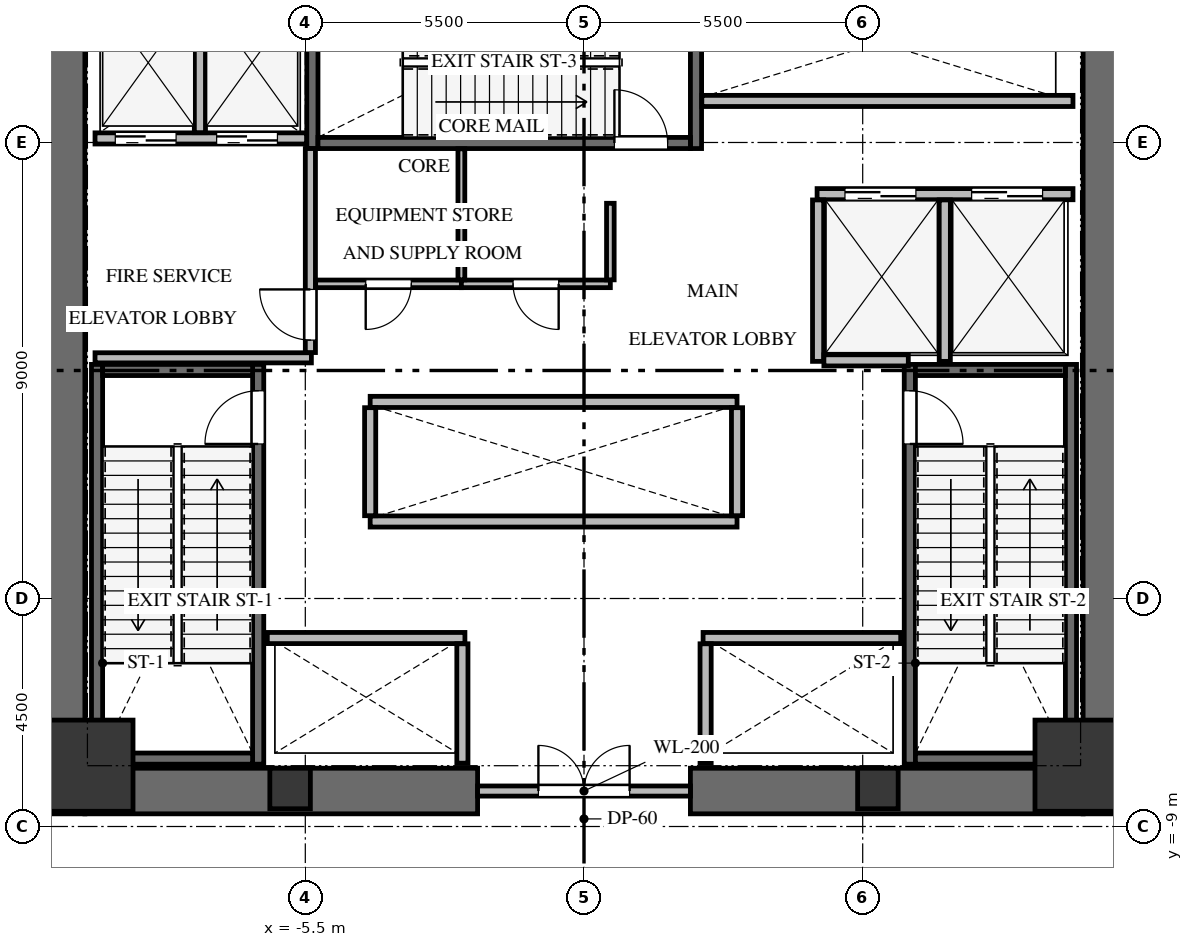
"""IFC4 building model, lengths in metres.
Left out: names, types, materials, properties, quantities, classifications, styles, units other than length and angle.
Written with IfcOpenShell. Run it as: python <this file> out.ifc"""

import sys

from ifc_helpers import new_model, si_unit, direction, frame, frame_2d, origin, origin_2d, place, context, subcontext, project, spatial, rectangle, extrude, source, transform, mapped, element, fill, save


model = new_model("IFC4")
c1 = context("Model", 3, precision=1e-05, world=origin(), true_north=direction((0.0, 1.0)))
c2 = subcontext(c1, "Body", "Model", "MODEL_VIEW")
j1 = project(units=[si_unit("LENGTHUNIT", "METRE"), si_unit("PLANEANGLEUNIT", "RADIAN")], contexts=[c1])
p1 = place(None, origin())
s1 = spatial("IfcSite", under=j1, at=p1, CompositionType="ELEMENT")
p2 = place(p1, origin())
s2 = spatial("IfcBuilding", under=s1, at=p2, CompositionType="ELEMENT")
p3 = place(p2, frame((0.0, 0.0, 15.6)))
s3 = spatial("IfcBuildingStorey", under=s2, at=p3, CompositionType="ELEMENT", Elevation=15.6)
for number, where, z_axis, x_axis in (
    (1, (-10.3, -8.75, 0.0), (0.0, 0.0, 1.0), (0.0, 1.0, 0.0)),
    (2, (10.3, -8.75, 0.0), (0.0, 0.0, 1.0), (0.0, 1.0, 0.0)),
):
    element("IfcWall", number, at=place(p3, frame(where, z_axis=z_axis, x_axis=x_axis)), inside=s3, PredefinedType="SHEAR", context=c2, shape_type="SweptSolid", body=[
        extrude(rectangle(XDim=17.5, YDim=0.9, at=frame_2d((8.75, 0.0))), origin(), (0.0, 0.0, 1.0), 5.6),
    ])
for number, where, z_axis, x_axis in (
    (3, (-9.85, -8.3, 0.0), (0.0, 0.0, 1.0), (1.0, 0.0, 0.0)),
    (4, (2.1, -8.3, 0.0), (0.0, 0.0, 1.0), (1.0, 0.0, 0.0)),
):
    element("IfcWall", number, at=place(p3, frame(where, z_axis=z_axis, x_axis=x_axis)), inside=s3, PredefinedType="SHEAR", context=c2, shape_type="SweptSolid", body=[
        extrude(rectangle(XDim=7.75, YDim=0.9, at=frame_2d((3.875, 0.0))), origin(), (0.0, 0.0, 1.0), 5.6),
    ])
p4 = place(p3, frame((-6.43, -7.77, -0.32), z_axis=(0.0, 0.0, 1.0), x_axis=(0.0, 1.0, 0.0)))
e5 = element("IfcWall", 5, at=p4, inside=s3, PredefinedType="SHEAR", context=c2, shape_type="SweptSolid", body=[
    extrude(rectangle(XDim=7.89, YDim=0.22, at=frame_2d((3.945, 0.0))), origin(), (0.0, 0.0, 1.0), 5.6),
])
p5 = place(p4, frame((6.32, 0.0, 0.0)))
e6 = element("IfcOpeningElement", 6, at=p5, cuts=e5, PredefinedType="OPENING", context=c2, shape_type="SweptSolid", body=[
    extrude(rectangle(XDim=1.05, YDim=2.15, at=frame_2d((0.525, 1.075))), frame((0.0, 0.12, 0.0), z_axis=(0.0, -1.0, 0.0), x_axis=(1.0, 0.0, 0.0)), (0.0, 0.0, 1.0), 0.24),
])
p6 = place(p3, frame((-9.61, 0.12, -0.32), z_axis=(0.0, 0.0, 1.0), x_axis=(0.0, -1.0, 0.0)))
e7 = element("IfcWall", 7, at=p6, inside=s3, PredefinedType="SHEAR", context=c2, shape_type="SweptSolid", body=[
    extrude(rectangle(XDim=7.89, YDim=0.22, at=frame_2d((3.945, 0.0))), origin(), (0.0, 0.0, 1.0), 5.6),
])
for number, where, z_axis, x_axis in (
    (8, (-9.5, -7.66, -0.32), (0.0, 0.0, 1.0), (1.0, 0.0, 0.0)),
    (9, (-6.54, 0.01, -0.32), (0.0, 0.0, 1.0), (-1.0, 0.0, 0.0)),
):
    element("IfcWall", number, at=place(p3, frame(where, z_axis=z_axis, x_axis=x_axis)), inside=s3, PredefinedType="SHEAR", context=c2, shape_type="SweptSolid", body=[
        extrude(rectangle(XDim=2.96, YDim=0.22, at=frame_2d((1.48, 0.0))), origin(), (0.0, 0.0, 1.0), 5.6),
    ])
p7 = place(p3, frame((9.61, -7.77, -0.32), z_axis=(0.0, 0.0, 1.0), x_axis=(0.0, 1.0, 0.0)))
e10 = element("IfcWall", 10, at=p7, inside=s3, PredefinedType="SHEAR", context=c2, shape_type="SweptSolid", body=[
    extrude(rectangle(XDim=7.89, YDim=0.22, at=frame_2d((3.945, 0.0))), origin(), (0.0, 0.0, 1.0), 5.6),
])
p8 = place(p3, frame((6.43, 0.12, -0.32), z_axis=(0.0, 0.0, 1.0), x_axis=(0.0, -1.0, 0.0)))
e11 = element("IfcWall", 11, at=p8, inside=s3, PredefinedType="SHEAR", context=c2, shape_type="SweptSolid", body=[
    extrude(rectangle(XDim=7.89, YDim=0.22, at=frame_2d((3.945, 0.0))), origin(), (0.0, 0.0, 1.0), 5.6),
])
p9 = place(p8, frame((0.52, 0.0, 0.0)))
e12 = element("IfcOpeningElement", 12, at=p9, cuts=e11, PredefinedType="OPENING", context=c2, shape_type="SweptSolid", body=[
    extrude(rectangle(XDim=1.05, YDim=2.15, at=frame_2d((0.525, 1.075))), frame((0.0, 0.12, 0.0), z_axis=(0.0, -1.0, 0.0), x_axis=(1.0, 0.0, 0.0)), (0.0, 0.0, 1.0), 0.24),
])
for number, where, z_axis, x_axis in (
    (13, (6.54, -7.66, -0.32), (0.0, 0.0, 1.0), (1.0, 0.0, 0.0)),
    (14, (9.5, 0.01, -0.32), (0.0, 0.0, 1.0), (-1.0, 0.0, 0.0)),
):
    element("IfcWall", number, at=place(p3, frame(where, z_axis=z_axis, x_axis=x_axis)), inside=s3, PredefinedType="SHEAR", context=c2, shape_type="SweptSolid", body=[
        extrude(rectangle(XDim=2.96, YDim=0.22, at=frame_2d((1.48, 0.0))), origin(), (0.0, 0.0, 1.0), 5.6),
    ])
for number, where, z_axis, x_axis in (
    (15, (2.21, 4.38, -0.32), (0.0, 0.0, 1.0), (0.0, 1.0, 0.0)),
    (16, (-5.36, 7.78, -0.32), (0.0, 0.0, 1.0), (0.0, -1.0, 0.0)),
):
    element("IfcWall", number, at=place(p3, frame(where, z_axis=z_axis, x_axis=x_axis)), inside=s3, PredefinedType="SHEAR", context=c2, shape_type="SweptSolid", body=[
        extrude(rectangle(XDim=3.4, YDim=0.22, at=frame_2d((1.7, 0.0))), origin(), (0.0, 0.0, 1.0), 5.6),
    ])
p10 = place(p3, frame((-5.25, 4.49, -0.32), z_axis=(0.0, 0.0, 1.0), x_axis=(1.0, 0.0, 0.0)))
e17 = element("IfcWall", 17, at=p10, inside=s3, PredefinedType="SHEAR", context=c2, shape_type="SweptSolid", body=[
    extrude(rectangle(XDim=7.35, YDim=0.22, at=frame_2d((3.675, 0.0))), origin(), (0.0, 0.0, 1.0), 5.6),
])
p11 = place(p10, frame((5.85, 0.0, 0.0)))
e18 = element("IfcOpeningElement", 18, at=p11, cuts=e17, PredefinedType="OPENING", context=c2, shape_type="SweptSolid", body=[
    extrude(rectangle(XDim=1.05, YDim=2.15, at=frame_2d((0.525, 1.075))), frame((0.0, 0.12, 0.0), z_axis=(0.0, -1.0, 0.0), x_axis=(1.0, 0.0, 0.0)), (0.0, 0.0, 1.0), 0.24),
])
m1 = source(origin(), c2, "Body", "SweptSolid", [
    extrude(rectangle(XDim=1.8, YDim=1.8, at=origin_2d()), origin(), (0.0, 0.0, 1.0), 5.6),
])
for number, where, z_axis, x_axis in (
    (19, (-9.8, -7.8, -0.32), (0.0, 0.0, 1.0), (1.0, 0.0, 0.0)),
    (20, (9.8, -7.8, -0.32), (0.0, 0.0, 1.0), (1.0, 0.0, 0.0)),
):
    element("IfcColumn", number, at=place(p3, frame(where, z_axis=z_axis, x_axis=x_axis)), inside=s3, PredefinedType="COLUMN", context=c2, shape_type="MappedRepresentation", body=[
        mapped(m1, transform((0.0, 0.0, 0.0), x_axis=(1.0, 0.0, 0.0), y_axis=(0.0, 1.0, 0.0), z_axis=(0.0, 0.0, 1.0), scale=1.0)),
    ])
m2 = source(origin(), c2, "Body", "SweptSolid", [
    extrude(rectangle(XDim=0.8, YDim=0.8, at=origin_2d()), origin(), (0.0, 0.0, 1.0), 5.6),
])
for number, where, z_axis, x_axis in (
    (21, (-5.8, -8.25, -0.32), (0.0, 0.0, 1.0), (1.0, 0.0, 0.0)),
    (22, (5.8, -8.25, -0.32), (0.0, 0.0, 1.0), (1.0, 0.0, 0.0)),
):
    element("IfcColumn", number, at=place(p3, frame(where, z_axis=z_axis, x_axis=x_axis)), inside=s3, PredefinedType="PILASTER", context=c2, shape_type="MappedRepresentation", body=[
        mapped(m2, transform((0.0, 0.0, 0.0), x_axis=(1.0, 0.0, 0.0), y_axis=(0.0, 1.0, 0.0), z_axis=(0.0, 0.0, 1.0), scale=1.0)),
    ])
p12 = place(p3, frame((-2.1, -8.3, 0.0), z_axis=(0.0, 0.0, 1.0), x_axis=(1.0, 0.0, 0.0)))
e23 = element("IfcWall", 23, at=p12, inside=s3, PredefinedType="SOLIDWALL", context=c2, shape_type="SweptSolid", body=[
    extrude(rectangle(XDim=4.2, YDim=0.2, at=frame_2d((2.1, 0.0))), origin(), (0.0, 0.0, 1.0), 5.265),
])
p13 = place(p12, frame((1.2, 0.0, 0.0)))
e24 = element("IfcOpeningElement", 24, at=p13, cuts=e23, PredefinedType="OPENING", context=c2, shape_type="SweptSolid", body=[
    extrude(rectangle(XDim=1.8, YDim=2.15, at=frame_2d((0.9, 1.075))), frame((0.0, 0.11, 0.0), z_axis=(0.0, -1.0, 0.0), x_axis=(1.0, 0.0, 0.0)), (0.0, 0.0, 1.0), 0.22),
])
p14 = place(p3, frame((-9.65, 4.58, 0.0), z_axis=(0.0, 0.0, 1.0), x_axis=(1.0, 0.0, 0.0)))
e25 = element("IfcWall", 25, at=p14, inside=s3, PredefinedType="SOLIDWALL", context=c2, shape_type="SweptSolid", body=[
    extrude(rectangle(XDim=4.175, YDim=0.22, at=frame_2d((2.087, 0.0))), origin(), (0.0, 0.0, 1.0), 5.265),
])
p15 = place(p14, frame((0.4, 0.0, 0.0)))
e26 = element("IfcOpeningElement", 26, at=p15, cuts=e25, PredefinedType="OPENING", context=c2, shape_type="SweptSolid", body=[
    extrude(rectangle(XDim=1.2, YDim=2.15, at=frame_2d((0.6, 1.075))), frame((0.0, 0.12, 0.0), z_axis=(0.0, -1.0, 0.0), x_axis=(1.0, 0.0, 0.0)), (0.0, 0.0, 1.0), 0.24),
])
p16 = place(p14, frame((2.4, 0.0, 0.0)))
e27 = element("IfcOpeningElement", 27, at=p16, cuts=e25, PredefinedType="OPENING", context=c2, shape_type="SweptSolid", body=[
    extrude(rectangle(XDim=1.2, YDim=2.15, at=frame_2d((0.6, 1.075))), frame((0.0, 0.12, 0.0), z_axis=(0.0, -1.0, 0.0), x_axis=(1.0, 0.0, 0.0)), (0.0, 0.0, 1.0), 0.24),
])
p17 = place(p3, frame((-7.58, 4.694, 0.0), z_axis=(0.0, 0.0, 1.0), x_axis=(0.0, 1.0, 0.0)))
e28 = element("IfcWall", 28, at=p17, inside=s3, PredefinedType="SOLIDWALL", context=c2, shape_type="SweptSolid", body=[
    extrude(rectangle(XDim=2.906, YDim=0.22, at=frame_2d((1.453, 0.0))), origin(), (0.0, 0.0, 1.0), 5.265),
])
p18 = place(p3, frame((-9.65, 0.25, 0.0), z_axis=(0.0, 0.0, 1.0), x_axis=(1.0, 0.0, 0.0)))
e29 = element("IfcWall", 29, at=p18, inside=s3, PredefinedType="SOLIDWALL", context=c2, shape_type="SweptSolid", body=[
    extrude(rectangle(XDim=4.27, YDim=0.2, at=frame_2d((2.135, 0.0))), origin(), (0.0, 0.0, 1.0), 5.265),
])
p19 = place(p3, frame((-5.4, 0.354, 0.0), z_axis=(0.0, 0.0, 1.0), x_axis=(0.0, 1.0, 0.0)))
e30 = element("IfcWall", 30, at=p19, inside=s3, PredefinedType="SOLIDWALL", context=c2, shape_type="SweptSolid", body=[
    extrude(rectangle(XDim=4.026, YDim=0.2, at=frame_2d((2.013, 0.0))), origin(), (0.0, 0.0, 1.0), 5.265),
])
p20 = place(p19, frame((0.246, 0.0, 0.0)))
e31 = element("IfcOpeningElement", 31, at=p20, cuts=e30, PredefinedType="OPENING", context=c2, shape_type="SweptSolid", body=[
    extrude(rectangle(XDim=1.0, YDim=2.15, at=frame_2d((0.5, 1.075))), frame((0.0, 0.11, 0.0), z_axis=(0.0, -1.0, 0.0), x_axis=(1.0, 0.0, 0.0)), (0.0, 0.0, 1.0), 0.22),
])
p21 = place(p3, frame((4.6, 3.48, 0.0), z_axis=(0.0, 0.0, 1.0), x_axis=(1.0, 0.0, 0.0)))
e32 = element("IfcWall", 32, at=p21, inside=s3, PredefinedType="SOLIDWALL", context=c2, shape_type="SweptSolid", body=[
    extrude(rectangle(XDim=5.05, YDim=0.22, at=frame_2d((2.525, 0.0))), origin(), (0.0, 0.0, 1.0), 5.265),
])
p22 = place(p21, frame((0.55, 0.0, 0.0)))
e33 = element("IfcOpeningElement", 33, at=p22, cuts=e32, PredefinedType="OPENING", context=c2, shape_type="SweptSolid", body=[
    extrude(rectangle(XDim=1.4, YDim=2.15, at=frame_2d((0.7, 1.075))), frame((0.0, 0.12, 0.0), z_axis=(0.0, -1.0, 0.0), x_axis=(1.0, 0.0, 0.0)), (0.0, 0.0, 1.0), 0.24),
])
p23 = place(p21, frame((3.05, 0.0, 0.0)))
e34 = element("IfcOpeningElement", 34, at=p23, cuts=e32, PredefinedType="OPENING", context=c2, shape_type="SweptSolid", body=[
    extrude(rectangle(XDim=1.4, YDim=2.15, at=frame_2d((0.7, 1.075))), frame((0.0, 0.12, 0.0), z_axis=(0.0, -1.0, 0.0), x_axis=(1.0, 0.0, 0.0)), (0.0, 0.0, 1.0), 0.24),
])
for number, where, z_axis, x_axis in (
    (35, (4.62, 0.18, 0.0), (0.0, 0.0, 1.0), (0.0, 1.0, 0.0)),
    (36, (7.12, 0.18, 0.0), (0.0, 0.0, 1.0), (0.0, 1.0, 0.0)),
):
    element("IfcWall", number, at=place(p3, frame(where, z_axis=z_axis, x_axis=x_axis)), inside=s3, PredefinedType="SOLIDWALL", context=c2, shape_type="SweptSolid", body=[
        extrude(rectangle(XDim=3.186, YDim=0.22, at=frame_2d((1.593, 0.0))), origin(), (0.0, 0.0, 1.0), 5.265),
    ])
p24 = place(p3, frame((4.734, 0.2, 0.0), z_axis=(0.0, 0.0, 1.0), x_axis=(1.0, 0.0, 0.0)))
e37 = element("IfcWall", 37, at=p24, inside=s3, PredefinedType="SOLIDWALL", context=c2, shape_type="SweptSolid", body=[
    extrude(rectangle(XDim=1.666, YDim=0.22, at=frame_2d((0.833, 0.0))), origin(), (0.0, 0.0, 1.0), 5.265),
])
for number, where, z_axis, x_axis in (
    (38, (-6.25, -5.28, 0.0), (0.0, 0.0, 1.0), (1.0, 0.0, 0.0)),
    (39, (2.35, -5.28, 0.0), (0.0, 0.0, 1.0), (1.0, 0.0, 0.0)),
):
    element("IfcWall", number, at=place(p3, frame(where, z_axis=z_axis, x_axis=x_axis)), inside=s3, PredefinedType="SOLIDWALL", context=c2, shape_type="SweptSolid", body=[
        extrude(rectangle(XDim=3.9, YDim=0.22, at=frame_2d((1.95, 0.0))), origin(), (0.0, 0.0, 1.0), 5.265),
    ])
for number, where, z_axis, x_axis in (
    (40, (-2.4, -7.75, 0.0), (0.0, 0.0, 1.0), (0.0, 1.0, 0.0)),
    (41, (2.4, -7.75, 0.0), (0.0, 0.0, 1.0), (0.0, 1.0, 0.0)),
):
    element("IfcWall", number, at=place(p3, frame(where, z_axis=z_axis, x_axis=x_axis)), inside=s3, PredefinedType="SOLIDWALL", context=c2, shape_type="SweptSolid", body=[
        extrude(rectangle(XDim=2.356, YDim=0.22, at=frame_2d((1.178, 0.0))), origin(), (0.0, 0.0, 1.0), 5.265),
    ])
for number, where, z_axis, x_axis in (
    (42, (-4.22, -2.98, 0.0), (0.0, 0.0, 1.0), (1.0, 0.0, 0.0)),
    (43, (-4.22, -0.62, 0.0), (0.0, 0.0, 1.0), (1.0, 0.0, 0.0)),
):
    element("IfcWall", number, at=place(p3, frame(where, z_axis=z_axis, x_axis=x_axis)), inside=s3, PredefinedType="SOLIDWALL", context=c2, shape_type="SweptSolid", body=[
        extrude(rectangle(XDim=7.24, YDim=0.22, at=frame_2d((3.62, 0.0))), origin(), (0.0, 0.0, 1.0), 5.265),
    ])
for number, where, z_axis, x_axis in (
    (44, (-4.22, -2.866, 0.0), (0.0, 0.0, 1.0), (0.0, 1.0, 0.0)),
    (45, (3.02, -2.866, 0.0), (0.0, 0.0, 1.0), (0.0, 1.0, 0.0)),
):
    element("IfcWall", number, at=place(p3, frame(where, z_axis=z_axis, x_axis=x_axis)), inside=s3, PredefinedType="SOLIDWALL", context=c2, shape_type="SweptSolid", body=[
        extrude(rectangle(XDim=2.132, YDim=0.22, at=frame_2d((1.066, 0.0))), origin(), (0.0, 0.0, 1.0), 5.265),
    ])
p25 = place(p3, frame((2.325, 5.32, 0.0), z_axis=(0.0, 0.0, 1.0), x_axis=(1.0, 0.0, 0.0)))
e46 = element("IfcWall", 46, at=p25, inside=s3, PredefinedType="SOLIDWALL", context=c2, shape_type="SweptSolid", body=[
    extrude(rectangle(XDim=7.325, YDim=0.22, at=frame_2d((3.663, 0.0))), origin(), (0.0, 0.0, 1.0), 5.265),
])
p26 = place(p3, frame((-2.42, 1.71, 0.0), z_axis=(0.0, 0.0, 1.0), x_axis=(-1.0, 0.0, 0.0)))
e47 = element("IfcWall", 47, at=p26, inside=s3, PredefinedType="PARTITIONING", context=c2, shape_type="SweptSolid", body=[
    extrude(rectangle(XDim=2.876, YDim=0.15, at=frame_2d((1.438, 0.0))), origin(), (0.0, 0.0, 1.0), 5.265),
])
p27 = place(p26, frame((0.988, 0.0, 0.0)))
e48 = element("IfcOpeningElement", 48, at=p27, cuts=e47, PredefinedType="OPENING", context=c2, shape_type="SweptSolid", body=[
    extrude(rectangle(XDim=0.9, YDim=2.05, at=frame_2d((0.45, 1.025))), frame((0.0, 0.085, 0.0), z_axis=(0.0, -1.0, 0.0), x_axis=(1.0, 0.0, 0.0)), (0.0, 0.0, 1.0), 0.17),
])
p28 = place(p3, frame((0.52, 1.71, 0.0), z_axis=(0.0, 0.0, 1.0), x_axis=(-1.0, 0.0, 0.0)))
e49 = element("IfcWall", 49, at=p28, inside=s3, PredefinedType="PARTITIONING", context=c2, shape_type="SweptSolid", body=[
    extrude(rectangle(XDim=2.94, YDim=0.15, at=frame_2d((1.47, 0.0))), origin(), (0.0, 0.0, 1.0), 5.265),
])
p29 = place(p28, frame((1.02, 0.0, 0.0)))
e50 = element("IfcOpeningElement", 50, at=p29, cuts=e49, PredefinedType="OPENING", context=c2, shape_type="SweptSolid", body=[
    extrude(rectangle(XDim=0.9, YDim=2.05, at=frame_2d((0.45, 1.025))), frame((0.0, 0.085, 0.0), z_axis=(0.0, -1.0, 0.0), x_axis=(1.0, 0.0, 0.0)), (0.0, 0.0, 1.0), 0.17),
])
p30 = place(p3, frame((0.52, 3.3, 0.0), z_axis=(0.0, 0.0, 1.0), x_axis=(0.0, -1.0, 0.0)))
e51 = element("IfcWall", 51, at=p30, inside=s3, PredefinedType="PARTITIONING", context=c2, shape_type="SweptSolid", body=[
    extrude(rectangle(XDim=1.511, YDim=0.15, at=frame_2d((0.755, 0.0))), origin(), (0.0, 0.0, 1.0), 5.265),
])
p31 = place(p3, frame((-2.42, 4.375, 0.0), z_axis=(0.0, 0.0, 1.0), x_axis=(0.0, -1.0, 0.0)))
e52 = element("IfcWall", 52, at=p31, inside=s3, PredefinedType="PARTITIONING", context=c2, shape_type="SweptSolid", body=[
    extrude(rectangle(XDim=2.586, YDim=0.135, at=frame_2d((1.293, 0.0))), origin(), (0.0, 0.0, 1.0), 5.265),
])
m3 = source(origin(), c2, "Body", "SweptSolid", [
    extrude(rectangle(XDim=1.05, YDim=2.15, at=frame_2d((0.525, 1.075))), frame((0.0, 0.025, 0.0), z_axis=(0.0, -1.0, 0.0), x_axis=(1.0, 0.0, 0.0)), (0.0, 0.0, 1.0), 0.05),
])
p32 = place(p5, origin())
e53 = element("IfcDoor", 53, at=p32, inside=s3, OperationType="SINGLE_SWING_LEFT", PredefinedType="DOOR", context=c2, shape_type="MappedRepresentation", body=[
    mapped(m3, transform((0.0, 0.0, 0.0), x_axis=(1.0, 0.0, 0.0), y_axis=(0.0, 1.0, 0.0), z_axis=(0.0, 0.0, 1.0), scale=1.0)),
])
fill(e6, e53)
m4 = source(origin(), c2, "Body", "SweptSolid", [
    extrude(rectangle(XDim=1.05, YDim=2.15, at=frame_2d((0.525, 1.075))), frame((0.0, 0.025, 0.0), z_axis=(0.0, -1.0, 0.0), x_axis=(1.0, 0.0, 0.0)), (0.0, 0.0, 1.0), 0.05),
])
p33 = place(p9, origin())
e54 = element("IfcDoor", 54, at=p33, inside=s3, OperationType="SINGLE_SWING_RIGHT", PredefinedType="DOOR", context=c2, shape_type="MappedRepresentation", body=[
    mapped(m4, transform((0.0, 0.0, 0.0), x_axis=(1.0, 0.0, 0.0), y_axis=(0.0, 1.0, 0.0), z_axis=(0.0, 0.0, 1.0), scale=1.0)),
])
fill(e12, e54)
p34 = place(p11, origin())
e55 = element("IfcDoor", 55, at=p34, inside=s3, OperationType="SINGLE_SWING_LEFT", PredefinedType="DOOR", context=c2, shape_type="MappedRepresentation", body=[
    mapped(m3, transform((0.0, 0.0, 0.0), x_axis=(1.0, 0.0, 0.0), y_axis=(0.0, 1.0, 0.0), z_axis=(0.0, 0.0, 1.0), scale=1.0)),
])
fill(e18, e55)
m5 = source(origin(), c2, "Body", "SweptSolid", [
    extrude(rectangle(XDim=1.8, YDim=2.15, at=frame_2d((0.9, 1.075))), frame((0.0, 0.025, 0.0), z_axis=(0.0, -1.0, 0.0), x_axis=(1.0, 0.0, 0.0)), (0.0, 0.0, 1.0), 0.05),
])
p35 = place(p13, origin())
e56 = element("IfcDoor", 56, at=p35, inside=s3, OperationType="DOUBLE_DOOR_SINGLE_SWING", PredefinedType="DOOR", context=c2, shape_type="MappedRepresentation", body=[
    mapped(m5, transform((0.0, 0.0, 0.0), x_axis=(1.0, 0.0, 0.0), y_axis=(0.0, 1.0, 0.0), z_axis=(0.0, 0.0, 1.0), scale=1.0)),
])
fill(e24, e56)
m6 = source(origin(), c2, "Body", "SweptSolid", [
    extrude(rectangle(XDim=1.2, YDim=2.15, at=frame_2d((0.6, 1.075))), frame((0.0, 0.025, 0.0), z_axis=(0.0, -1.0, 0.0), x_axis=(1.0, 0.0, 0.0)), (0.0, 0.0, 1.0), 0.05),
])
p36 = place(p15, origin())
e57 = element("IfcDoor", 57, at=p36, inside=s3, OperationType="DOUBLE_DOOR_SLIDING", PredefinedType="DOOR", context=c2, shape_type="MappedRepresentation", body=[
    mapped(m6, transform((0.0, 0.0, 0.0), x_axis=(1.0, 0.0, 0.0), y_axis=(0.0, 1.0, 0.0), z_axis=(0.0, 0.0, 1.0), scale=1.0)),
])
fill(e26, e57)
p37 = place(p16, origin())
e58 = element("IfcDoor", 58, at=p37, inside=s3, OperationType="DOUBLE_DOOR_SLIDING", PredefinedType="DOOR", context=c2, shape_type="MappedRepresentation", body=[
    mapped(m6, transform((0.0, 0.0, 0.0), x_axis=(1.0, 0.0, 0.0), y_axis=(0.0, 1.0, 0.0), z_axis=(0.0, 0.0, 1.0), scale=1.0)),
])
fill(e27, e58)
m7 = source(origin(), c2, "Body", "SweptSolid", [
    extrude(rectangle(XDim=1.0, YDim=2.15, at=frame_2d((0.5, 1.075))), frame((0.0, 0.025, 0.0), z_axis=(0.0, -1.0, 0.0), x_axis=(1.0, 0.0, 0.0)), (0.0, 0.0, 1.0), 0.05),
])
p38 = place(p20, origin())
e59 = element("IfcDoor", 59, at=p38, inside=s3, OperationType="SINGLE_SWING_RIGHT", PredefinedType="DOOR", context=c2, shape_type="MappedRepresentation", body=[
    mapped(m7, transform((0.0, 0.0, 0.0), x_axis=(1.0, 0.0, 0.0), y_axis=(0.0, 1.0, 0.0), z_axis=(0.0, 0.0, 1.0), scale=1.0)),
])
fill(e31, e59)
m8 = source(origin(), c2, "Body", "SweptSolid", [
    extrude(rectangle(XDim=1.4, YDim=2.15, at=frame_2d((0.7, 1.075))), frame((0.0, 0.025, 0.0), z_axis=(0.0, -1.0, 0.0), x_axis=(1.0, 0.0, 0.0)), (0.0, 0.0, 1.0), 0.05),
])
p39 = place(p22, origin())
e60 = element("IfcDoor", 60, at=p39, inside=s3, OperationType="DOUBLE_DOOR_SLIDING", PredefinedType="DOOR", context=c2, shape_type="MappedRepresentation", body=[
    mapped(m8, transform((0.0, 0.0, 0.0), x_axis=(1.0, 0.0, 0.0), y_axis=(0.0, 1.0, 0.0), z_axis=(0.0, 0.0, 1.0), scale=1.0)),
])
fill(e33, e60)
p40 = place(p23, origin())
e61 = element("IfcDoor", 61, at=p40, inside=s3, OperationType="DOUBLE_DOOR_SLIDING", PredefinedType="DOOR", context=c2, shape_type="MappedRepresentation", body=[
    mapped(m8, transform((0.0, 0.0, 0.0), x_axis=(1.0, 0.0, 0.0), y_axis=(0.0, 1.0, 0.0), z_axis=(0.0, 0.0, 1.0), scale=1.0)),
])
fill(e34, e61)
m9 = source(origin(), c2, "Body", "SweptSolid", [
    extrude(rectangle(XDim=0.9, YDim=2.05, at=frame_2d((0.45, 1.025))), frame((0.0, 0.025, 0.0), z_axis=(0.0, -1.0, 0.0), x_axis=(1.0, 0.0, 0.0)), (0.0, 0.0, 1.0), 0.05),
])
p41 = place(p27, origin())
e62 = element("IfcDoor", 62, at=p41, inside=s3, OperationType="SINGLE_SWING_RIGHT", PredefinedType="DOOR", context=c2, shape_type="MappedRepresentation", body=[
    mapped(m9, transform((0.0, 0.0, 0.0), x_axis=(1.0, 0.0, 0.0), y_axis=(0.0, 1.0, 0.0), z_axis=(0.0, 0.0, 1.0), scale=1.0)),
])
fill(e48, e62)
m10 = source(origin(), c2, "Body", "SweptSolid", [
    extrude(rectangle(XDim=0.9, YDim=2.05, at=frame_2d((0.45, 1.025))), frame((0.0, 0.025, 0.0), z_axis=(0.0, -1.0, 0.0), x_axis=(1.0, 0.0, 0.0)), (0.0, 0.0, 1.0), 0.05),
])
p42 = place(p29, origin())
e63 = element("IfcDoor", 63, at=p42, inside=s3, OperationType="SINGLE_SWING_LEFT", PredefinedType="DOOR", context=c2, shape_type="MappedRepresentation", body=[
    mapped(m10, transform((0.0, 0.0, 0.0), x_axis=(1.0, 0.0, 0.0), y_axis=(0.0, 1.0, 0.0), z_axis=(0.0, 0.0, 1.0), scale=1.0)),
])
fill(e50, e63)
save(model, sys.argv[1])
